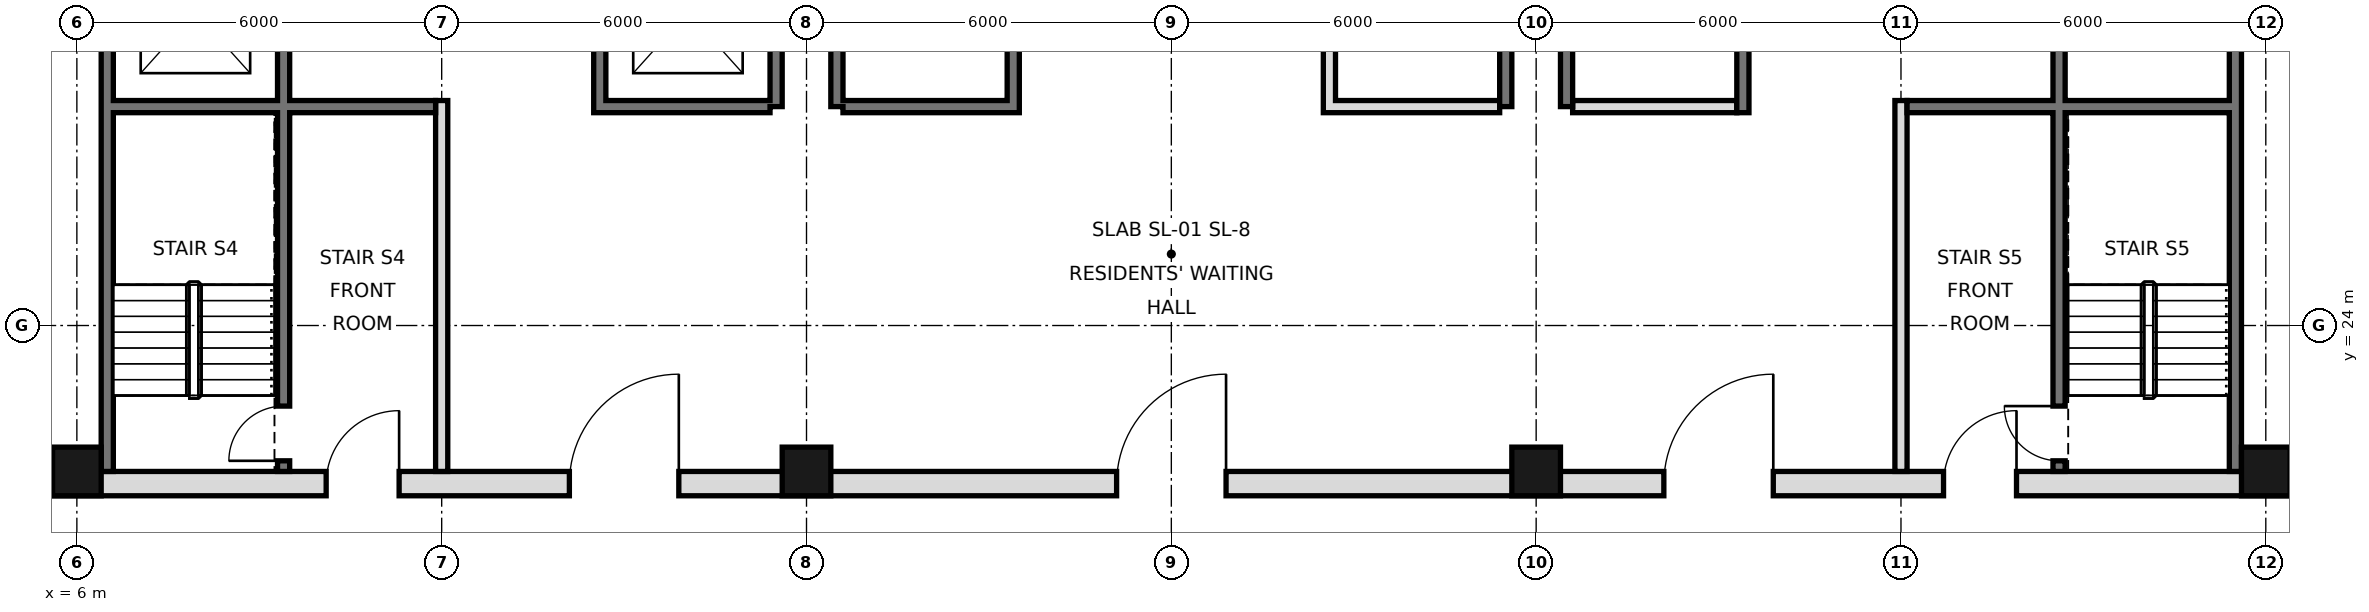
"""IFC4 building model, lengths in metres.
Left out: names, types, materials, properties, quantities, classifications, styles, units other than length and angle.
Written with IfcOpenShell. Run it as: python <this file> out.ifc"""

import sys

from ifc_helpers import new_model, si_unit, direction, frame, frame_2d, origin, origin_2d, place, context, subcontext, project, spatial, rectangle, hollow_rectangle, extrude, element, fill, save


model = new_model("IFC4")
c1 = context("Model", 3, precision=1e-05, world=origin(), true_north=direction((0.0, 1.0)))
c2 = subcontext(c1, "Body", "Model", "MODEL_VIEW")
j1 = project(units=[si_unit("LENGTHUNIT", "METRE"), si_unit("PLANEANGLEUNIT", "RADIAN")], contexts=[c1])
p1 = place(None, origin())
s1 = spatial("IfcSite", under=j1, at=p1, CompositionType="ELEMENT")
p2 = place(p1, origin())
s2 = spatial("IfcBuilding", under=s1, at=p2, CompositionType="ELEMENT")
p3 = place(p2, frame((0.0, 0.0, 114.2)))
s3 = spatial("IfcBuildingStorey", under=s2, at=p3, CompositionType="ELEMENT", Elevation=114.2)
for number, where, z_axis, x_axis in (
    (1, (6.0, 21.6, 0.0), (0.0, 0.0, 1.0), (1.0, 0.0, 0.0)),
    (2, (18.0, 21.6, 0.0), (0.0, 0.0, 1.0), (1.0, 0.0, 0.0)),
    (3, (30.0, 21.6, 0.0), (0.0, 0.0, 1.0), (1.0, 0.0, 0.0)),
    (4, (42.0, 21.6, 0.0), (0.0, 0.0, 1.0), (1.0, 0.0, 0.0)),
):
    element("IfcColumn", number, at=place(p3, frame(where, z_axis=z_axis, x_axis=x_axis)), inside=s3, PredefinedType="COLUMN", context=c2, shape_type="SweptSolid", body=[
        extrude(hollow_rectangle(XDim=0.8, YDim=0.8, WallThickness=0.05, at=origin_2d()), origin(), (0.0, 0.0, 1.0), 5.4),
    ])
for number, where, z_axis, x_axis in (
    (5, (6.5, 21.6, 0.0), (0.0, 0.0, 1.0), (0.0, 1.0, 0.0)),
    (6, (41.5, 21.6, 0.0), (0.0, 0.0, 1.0), (0.0, 1.0, 0.0)),
):
    element("IfcWall", number, at=place(p3, frame(where, z_axis=z_axis, x_axis=x_axis)), inside=s3, PredefinedType="SOLIDWALL", context=c2, shape_type="SweptSolid", body=[
        extrude(rectangle(XDim=23.5, YDim=0.2, at=frame_2d((11.75, 0.0))), origin(), (0.0, 0.0, 1.0), 5.22),
    ])
for number, where, z_axis, x_axis in (
    (7, (17.5, 27.6, 0.0), (0.0, 0.0, 1.0), (0.0, 1.0, 0.0)),
    (8, (18.5, 27.6, 0.0), (0.0, 0.0, 1.0), (0.0, 1.0, 0.0)),
    (9, (29.5, 27.6, 0.0), (0.0, 0.0, 1.0), (0.0, 1.0, 0.0)),
    (10, (30.5, 27.6, 0.0), (0.0, 0.0, 1.0), (0.0, 1.0, 0.0)),
):
    element("IfcWall", number, at=place(p3, frame(where, z_axis=z_axis, x_axis=x_axis)), inside=s3, PredefinedType="SOLIDWALL", context=c2, shape_type="SweptSolid", body=[
        extrude(rectangle(XDim=17.5, YDim=0.2, at=frame_2d((8.75, 0.0))), origin(), (0.0, 0.0, 1.0), 5.22),
    ])
p4 = place(p3, frame((5.6, 21.4, 0.0), z_axis=(0.0, 0.0, 1.0), x_axis=(1.0, 0.0, 0.0)))
e11 = element("IfcWall", 11, at=p4, inside=s3, PredefinedType="SOLIDWALL", context=c2, shape_type="SweptSolid", body=[
    extrude(rectangle(XDim=36.8, YDim=0.4, at=frame_2d((18.4, 0.0))), origin(), (0.0, 0.0, 1.0), 5.22),
])
p5 = place(p4, frame((8.5, 0.0, 0.0)))
e12 = element("IfcOpeningElement", 12, at=p5, cuts=e11, PredefinedType="OPENING", context=c2, shape_type="SweptSolid", body=[
    extrude(rectangle(XDim=1.8, YDim=2.1, at=frame_2d((0.9, 1.05))), frame((0.0, 0.21, 0.0), z_axis=(0.0, -1.0, 0.0), x_axis=(1.0, 0.0, 0.0)), (0.0, 0.0, 1.0), 0.42),
])
p6 = place(p4, frame((17.5, 0.0, 0.0)))
e13 = element("IfcOpeningElement", 13, at=p6, cuts=e11, PredefinedType="OPENING", context=c2, shape_type="SweptSolid", body=[
    extrude(rectangle(XDim=1.8, YDim=2.1, at=frame_2d((0.9, 1.05))), frame((0.0, 0.21, 0.0), z_axis=(0.0, -1.0, 0.0), x_axis=(1.0, 0.0, 0.0)), (0.0, 0.0, 1.0), 0.42),
])
p7 = place(p4, frame((26.5, 0.0, 0.0)))
e14 = element("IfcOpeningElement", 14, at=p7, cuts=e11, PredefinedType="OPENING", context=c2, shape_type="SweptSolid", body=[
    extrude(rectangle(XDim=1.8, YDim=2.1, at=frame_2d((0.9, 1.05))), frame((0.0, 0.21, 0.0), z_axis=(0.0, -1.0, 0.0), x_axis=(1.0, 0.0, 0.0)), (0.0, 0.0, 1.0), 0.42),
])
p8 = place(p4, frame((4.5, 0.0, 0.0)))
e15 = element("IfcOpeningElement", 15, at=p8, cuts=e11, PredefinedType="OPENING", context=c2, shape_type="SweptSolid", body=[
    extrude(rectangle(XDim=1.2, YDim=2.1, at=frame_2d((0.6, 1.05))), frame((0.0, 0.21, 0.0), z_axis=(0.0, -1.0, 0.0), x_axis=(1.0, 0.0, 0.0)), (0.0, 0.0, 1.0), 0.42),
])
p9 = place(p4, frame((31.1, 0.0, 0.0)))
e16 = element("IfcOpeningElement", 16, at=p9, cuts=e11, PredefinedType="OPENING", context=c2, shape_type="SweptSolid", body=[
    extrude(rectangle(XDim=1.2, YDim=2.1, at=frame_2d((0.6, 1.05))), frame((0.0, 0.21, 0.0), z_axis=(0.0, -1.0, 0.0), x_axis=(1.0, 0.0, 0.0)), (0.0, 0.0, 1.0), 0.42),
])
p10 = place(p3, frame((12.0, 21.6, 0.0), z_axis=(0.0, 0.0, 1.0), x_axis=(0.0, 1.0, 0.0)))
e17 = element("IfcWall", 17, at=p10, inside=s3, PredefinedType="PARTITIONING", context=c2, shape_type="SweptSolid", body=[
    extrude(rectangle(XDim=6.1, YDim=0.2, at=frame_2d((3.05, 0.0))), origin(), (0.0, 0.0, 1.0), 5.22),
])
p11 = place(p3, frame((14.6, 27.5, 0.0), z_axis=(0.0, 0.0, 1.0), x_axis=(0.0, 1.0, 0.0)))
e18 = element("IfcWall", 18, at=p11, inside=s3, PredefinedType="SOLIDWALL", context=c2, shape_type="SweptSolid", body=[
    extrude(rectangle(XDim=17.5, YDim=0.2, at=frame_2d((8.75, 0.0))), origin(), (0.0, 0.0, 1.0), 5.22),
])
p12 = place(p11, frame((1.1, 0.0, 0.0)))
e19 = element("IfcOpeningElement", 19, at=p12, cuts=e18, PredefinedType="OPENING", context=c2, shape_type="SweptSolid", body=[
    extrude(rectangle(XDim=1.1, YDim=2.1, at=frame_2d((0.55, 1.05))), frame((0.0, 0.11, 0.0), z_axis=(0.0, -1.0, 0.0), x_axis=(1.0, 0.0, 0.0)), (0.0, 0.0, 1.0), 0.22),
])
p13 = place(p11, frame((4.2, 0.0, 0.0)))
e20 = element("IfcOpeningElement", 20, at=p13, cuts=e18, PredefinedType="OPENING", context=c2, shape_type="SweptSolid", body=[
    extrude(rectangle(XDim=1.1, YDim=2.1, at=frame_2d((0.55, 1.05))), frame((0.0, 0.11, 0.0), z_axis=(0.0, -1.0, 0.0), x_axis=(1.0, 0.0, 0.0)), (0.0, 0.0, 1.0), 0.22),
])
p14 = place(p11, frame((15.4, 0.0, 0.0)))
e21 = element("IfcOpeningElement", 21, at=p14, cuts=e18, PredefinedType="OPENING", context=c2, shape_type="SweptSolid", body=[
    extrude(rectangle(XDim=1.1, YDim=2.1, at=frame_2d((0.55, 1.05))), frame((0.0, 0.11, 0.0), z_axis=(0.0, -1.0, 0.0), x_axis=(1.0, 0.0, 0.0)), (0.0, 0.0, 1.0), 0.22),
])
p15 = place(p11, frame((9.9, 0.0, 0.0)))
e22 = element("IfcOpeningElement", 22, at=p15, cuts=e18, PredefinedType="OPENING", context=c2, shape_type="SweptSolid", body=[
    extrude(rectangle(XDim=0.9, YDim=2.1, at=frame_2d((0.45, 1.05))), frame((0.0, 0.11, 0.0), z_axis=(0.0, -1.0, 0.0), x_axis=(1.0, 0.0, 0.0)), (0.0, 0.0, 1.0), 0.22),
])
p16 = place(p3, frame((21.4, 27.5, 0.0), z_axis=(0.0, 0.0, 1.0), x_axis=(0.0, 1.0, 0.0)))
e23 = element("IfcWall", 23, at=p16, inside=s3, PredefinedType="SOLIDWALL", context=c2, shape_type="SweptSolid", body=[
    extrude(rectangle(XDim=17.5, YDim=0.2, at=frame_2d((8.75, 0.0))), origin(), (0.0, 0.0, 1.0), 5.22),
])
p17 = place(p16, frame((16.2, 0.0, 0.0)))
e24 = element("IfcOpeningElement", 24, at=p17, cuts=e23, PredefinedType="OPENING", context=c2, shape_type="SweptSolid", body=[
    extrude(rectangle(XDim=1.0, YDim=2.1, at=frame_2d((0.5, 1.05))), frame((0.0, 0.11, 0.0), z_axis=(0.0, -1.0, 0.0), x_axis=(1.0, 0.0, 0.0)), (0.0, 0.0, 1.0), 0.22),
])
p18 = place(p16, frame((7.4, 0.0, 0.0)))
e25 = element("IfcOpeningElement", 25, at=p18, cuts=e23, PredefinedType="OPENING", context=c2, shape_type="SweptSolid", body=[
    extrude(rectangle(XDim=0.9, YDim=2.1, at=frame_2d((0.45, 1.05))), frame((0.0, 0.11, 0.0), z_axis=(0.0, -1.0, 0.0), x_axis=(1.0, 0.0, 0.0)), (0.0, 0.0, 1.0), 0.22),
])
p19 = place(p3, frame((26.6, 27.5, 0.0), z_axis=(0.0, 0.0, 1.0), x_axis=(0.0, 1.0, 0.0)))
e26 = element("IfcWall", 26, at=p19, inside=s3, PredefinedType="SOLIDWALL", context=c2, shape_type="SweptSolid", body=[
    extrude(rectangle(XDim=17.5, YDim=0.2, at=frame_2d((8.75, 0.0))), origin(), (0.0, 0.0, 1.0), 5.22),
])
p20 = place(p19, frame((4.3, 0.0, 0.0)))
e27 = element("IfcOpeningElement", 27, at=p20, cuts=e26, PredefinedType="OPENING", context=c2, shape_type="SweptSolid", body=[
    extrude(rectangle(XDim=0.9, YDim=2.1, at=frame_2d((0.45, 1.05))), frame((0.0, 0.11, 0.0), z_axis=(0.0, -1.0, 0.0), x_axis=(1.0, 0.0, 0.0)), (0.0, 0.0, 1.0), 0.22),
])
p21 = place(p19, frame((10.35, 0.0, 0.0)))
e28 = element("IfcOpeningElement", 28, at=p21, cuts=e26, PredefinedType="OPENING", context=c2, shape_type="SweptSolid", body=[
    extrude(rectangle(XDim=1.0, YDim=2.1, at=frame_2d((0.5, 1.05))), frame((0.0, 0.11, 0.0), z_axis=(0.0, -1.0, 0.0), x_axis=(1.0, 0.0, 0.0)), (0.0, 0.0, 1.0), 0.22),
])
p22 = place(p19, frame((14.575, 0.0, 0.0)))
e29 = element("IfcOpeningElement", 29, at=p22, cuts=e26, PredefinedType="OPENING", context=c2, shape_type="SweptSolid", body=[
    extrude(rectangle(XDim=1.0, YDim=2.1, at=frame_2d((0.5, 1.05))), frame((0.0, 0.11, 0.0), z_axis=(0.0, -1.0, 0.0), x_axis=(1.0, 0.0, 0.0)), (0.0, 0.0, 1.0), 0.22),
])
p23 = place(p3, frame((33.4, 27.5, 0.0), z_axis=(0.0, 0.0, 1.0), x_axis=(0.0, 1.0, 0.0)))
e30 = element("IfcWall", 30, at=p23, inside=s3, PredefinedType="SOLIDWALL", context=c2, shape_type="SweptSolid", body=[
    extrude(rectangle(XDim=17.5, YDim=0.2, at=frame_2d((8.75, 0.0))), origin(), (0.0, 0.0, 1.0), 5.22),
])
p24 = place(p23, frame((15.4, 0.0, 0.0)))
e31 = element("IfcOpeningElement", 31, at=p24, cuts=e30, PredefinedType="OPENING", context=c2, shape_type="SweptSolid", body=[
    extrude(rectangle(XDim=1.1, YDim=2.1, at=frame_2d((0.55, 1.05))), frame((0.0, 0.11, 0.0), z_axis=(0.0, -1.0, 0.0), x_axis=(1.0, 0.0, 0.0)), (0.0, 0.0, 1.0), 0.22),
])
p25 = place(p23, frame((2.7, 0.0, 0.0)))
e32 = element("IfcOpeningElement", 32, at=p25, cuts=e30, PredefinedType="OPENING", context=c2, shape_type="SweptSolid", body=[
    extrude(rectangle(XDim=1.0, YDim=2.1, at=frame_2d((0.5, 1.05))), frame((0.0, 0.11, 0.0), z_axis=(0.0, -1.0, 0.0), x_axis=(1.0, 0.0, 0.0)), (0.0, 0.0, 1.0), 0.22),
])
p26 = place(p23, frame((9.9, 0.0, 0.0)))
e33 = element("IfcOpeningElement", 33, at=p26, cuts=e30, PredefinedType="OPENING", context=c2, shape_type="SweptSolid", body=[
    extrude(rectangle(XDim=0.9, YDim=2.1, at=frame_2d((0.45, 1.05))), frame((0.0, 0.11, 0.0), z_axis=(0.0, -1.0, 0.0), x_axis=(1.0, 0.0, 0.0)), (0.0, 0.0, 1.0), 0.22),
])
p27 = place(p3, frame((36.0, 21.6, 0.0), z_axis=(0.0, 0.0, 1.0), x_axis=(0.0, 1.0, 0.0)))
e34 = element("IfcWall", 34, at=p27, inside=s3, PredefinedType="PARTITIONING", context=c2, shape_type="SweptSolid", body=[
    extrude(rectangle(XDim=6.1, YDim=0.2, at=frame_2d((3.05, 0.0))), origin(), (0.0, 0.0, 1.0), 5.22),
])
p28 = place(p3, frame((38.6, 21.6, 0.0), z_axis=(0.0, 0.0, 1.0), x_axis=(0.0, 1.0, 0.0)))
e35 = element("IfcWall", 35, at=p28, inside=s3, PredefinedType="SOLIDWALL", context=c2, shape_type="SweptSolid", body=[
    extrude(rectangle(XDim=23.4, YDim=0.2, at=frame_2d((11.7, 0.0))), origin(), (0.0, 0.0, 1.0), 5.22),
])
p29 = place(p28, frame((8.6, 0.0, 0.0)))
e36 = element("IfcOpeningElement", 36, at=p29, cuts=e35, PredefinedType="OPENING", context=c2, shape_type="SweptSolid", body=[
    extrude(rectangle(XDim=1.0, YDim=2.1, at=frame_2d((0.5, 1.05))), frame((0.0, 0.11, 0.0), z_axis=(0.0, -1.0, 0.0), x_axis=(1.0, 0.0, 0.0)), (0.0, 0.0, 1.0), 0.22),
])
p30 = place(p28, frame((13.25, 0.0, 0.0)))
e37 = element("IfcOpeningElement", 37, at=p30, cuts=e35, PredefinedType="OPENING", context=c2, shape_type="SweptSolid", body=[
    extrude(rectangle(XDim=1.0, YDim=2.1, at=frame_2d((0.5, 1.05))), frame((0.0, 0.11, 0.0), z_axis=(0.0, -1.0, 0.0), x_axis=(1.0, 0.0, 0.0)), (0.0, 0.0, 1.0), 0.22),
])
p31 = place(p28, frame((22.1, 0.0, 0.0)))
e38 = element("IfcOpeningElement", 38, at=p31, cuts=e35, PredefinedType="OPENING", context=c2, shape_type="SweptSolid", body=[
    extrude(rectangle(XDim=1.0, YDim=2.1, at=frame_2d((0.5, 1.05))), frame((0.0, 0.11, 0.0), z_axis=(0.0, -1.0, 0.0), x_axis=(1.0, 0.0, 0.0)), (0.0, 0.0, 1.0), 0.22),
])
p32 = place(p28, frame((0.175, 0.0, 0.0)))
e39 = element("IfcOpeningElement", 39, at=p32, cuts=e35, PredefinedType="OPENING", context=c2, shape_type="SweptSolid", body=[
    extrude(rectangle(XDim=0.9, YDim=2.1, at=frame_2d((0.45, 1.05))), frame((0.0, 0.11, 0.0), z_axis=(0.0, -1.0, 0.0), x_axis=(1.0, 0.0, 0.0)), (0.0, 0.0, 1.0), 0.22),
])
p33 = place(p3, frame((9.4, 21.6, 0.0), z_axis=(0.0, 0.0, 1.0), x_axis=(0.0, 1.0, 0.0)))
e40 = element("IfcWall", 40, at=p33, inside=s3, PredefinedType="SOLIDWALL", context=c2, shape_type="SweptSolid", body=[
    extrude(rectangle(XDim=23.4, YDim=0.2, at=frame_2d((11.7, 0.0))), origin(), (0.0, 0.0, 1.0), 5.22),
])
p34 = place(p33, frame((7.0, 0.0, 0.0)))
e41 = element("IfcOpeningElement", 41, at=p34, cuts=e40, PredefinedType="OPENING", context=c2, shape_type="SweptSolid", body=[
    extrude(rectangle(XDim=1.1, YDim=2.1, at=frame_2d((0.55, 1.05))), frame((0.0, 0.11, 0.0), z_axis=(0.0, -1.0, 0.0), x_axis=(1.0, 0.0, 0.0)), (0.0, 0.0, 1.0), 0.22),
])
p35 = place(p33, frame((10.1, 0.0, 0.0)))
e42 = element("IfcOpeningElement", 42, at=p35, cuts=e40, PredefinedType="OPENING", context=c2, shape_type="SweptSolid", body=[
    extrude(rectangle(XDim=1.1, YDim=2.1, at=frame_2d((0.55, 1.05))), frame((0.0, 0.11, 0.0), z_axis=(0.0, -1.0, 0.0), x_axis=(1.0, 0.0, 0.0)), (0.0, 0.0, 1.0), 0.22),
])
p36 = place(p33, frame((13.2, 0.0, 0.0)))
e43 = element("IfcOpeningElement", 43, at=p36, cuts=e40, PredefinedType="OPENING", context=c2, shape_type="SweptSolid", body=[
    extrude(rectangle(XDim=1.1, YDim=2.1, at=frame_2d((0.55, 1.05))), frame((0.0, 0.11, 0.0), z_axis=(0.0, -1.0, 0.0), x_axis=(1.0, 0.0, 0.0)), (0.0, 0.0, 1.0), 0.22),
])
p37 = place(p33, frame((22.1, 0.0, 0.0)))
e44 = element("IfcOpeningElement", 44, at=p37, cuts=e40, PredefinedType="OPENING", context=c2, shape_type="SweptSolid", body=[
    extrude(rectangle(XDim=1.0, YDim=2.1, at=frame_2d((0.5, 1.05))), frame((0.0, 0.11, 0.0), z_axis=(0.0, -1.0, 0.0), x_axis=(1.0, 0.0, 0.0)), (0.0, 0.0, 1.0), 0.22),
])
p38 = place(p33, frame((0.175, 0.0, 0.0)))
e45 = element("IfcOpeningElement", 45, at=p38, cuts=e40, PredefinedType="OPENING", context=c2, shape_type="SweptSolid", body=[
    extrude(rectangle(XDim=0.9, YDim=2.1, at=frame_2d((0.45, 1.05))), frame((0.0, 0.11, 0.0), z_axis=(0.0, -1.0, 0.0), x_axis=(1.0, 0.0, 0.0)), (0.0, 0.0, 1.0), 0.22),
])
for number, where, z_axis, x_axis in (
    (46, (14.7, 27.6, 0.0), (0.0, 0.0, 1.0), (1.0, 0.0, 0.0)),
    (47, (18.6, 27.6, 0.0), (0.0, 0.0, 1.0), (1.0, 0.0, 0.0)),
    (48, (26.7, 27.6, 0.0), (0.0, 0.0, 1.0), (1.0, 0.0, 0.0)),
):
    element("IfcWall", number, at=place(p3, frame(where, z_axis=z_axis, x_axis=x_axis)), inside=s3, PredefinedType="SOLIDWALL", context=c2, shape_type="SweptSolid", body=[
        extrude(rectangle(XDim=2.7, YDim=0.2, at=frame_2d((1.35, 0.0))), origin(), (0.0, 0.0, 1.0), 5.22),
    ])
p39 = place(p3, frame((30.6, 27.6, 0.0), z_axis=(0.0, 0.0, 1.0), x_axis=(1.0, 0.0, 0.0)))
e49 = element("IfcWall", 49, at=p39, inside=s3, PredefinedType="PARTITIONING", context=c2, shape_type="SweptSolid", body=[
    extrude(rectangle(XDim=2.7, YDim=0.2, at=frame_2d((1.35, 0.0))), origin(), (0.0, 0.0, 1.0), 5.22),
])
for number, where, z_axis, x_axis in (
    (50, (36.1, 27.6, 0.0), (0.0, 0.0, 1.0), (1.0, 0.0, 0.0)),
    (51, (6.6, 27.6, 0.0), (0.0, 0.0, 1.0), (1.0, 0.0, 0.0)),
):
    element("IfcWall", number, at=place(p3, frame(where, z_axis=z_axis, x_axis=x_axis)), inside=s3, PredefinedType="SOLIDWALL", context=c2, shape_type="SweptSolid", body=[
        extrude(rectangle(XDim=5.3, YDim=0.2, at=frame_2d((2.65, 0.0))), origin(), (0.0, 0.0, 1.0), 5.22),
    ])
p40 = place(p5, frame((1.8, 0.0, 0.0), z_axis=(0.0, 0.0, 1.0), x_axis=(-1.0, 0.0, 0.0)))
e52 = element("IfcDoor", 52, at=p40, inside=s3, OperationType="SINGLE_SWING_LEFT", PredefinedType="DOOR", context=c2, shape_type="SweptSolid", body=[
    extrude(rectangle(XDim=1.8, YDim=2.1, at=frame_2d((0.9, 1.05))), frame((0.0, 0.025, 0.0), z_axis=(0.0, -1.0, 0.0), x_axis=(1.0, 0.0, 0.0)), (0.0, 0.0, 1.0), 0.05),
])
fill(e12, e52)
p41 = place(p6, frame((1.8, 0.0, 0.0), z_axis=(0.0, 0.0, 1.0), x_axis=(-1.0, 0.0, 0.0)))
e53 = element("IfcDoor", 53, at=p41, inside=s3, OperationType="SINGLE_SWING_LEFT", PredefinedType="DOOR", context=c2, shape_type="SweptSolid", body=[
    extrude(rectangle(XDim=1.8, YDim=2.1, at=frame_2d((0.9, 1.05))), frame((0.0, 0.025, 0.0), z_axis=(0.0, -1.0, 0.0), x_axis=(1.0, 0.0, 0.0)), (0.0, 0.0, 1.0), 0.05),
])
fill(e13, e53)
p42 = place(p7, frame((1.8, 0.0, 0.0), z_axis=(0.0, 0.0, 1.0), x_axis=(-1.0, 0.0, 0.0)))
e54 = element("IfcDoor", 54, at=p42, inside=s3, OperationType="SINGLE_SWING_LEFT", PredefinedType="DOOR", context=c2, shape_type="SweptSolid", body=[
    extrude(rectangle(XDim=1.8, YDim=2.1, at=frame_2d((0.9, 1.05))), frame((0.0, 0.025, 0.0), z_axis=(0.0, -1.0, 0.0), x_axis=(1.0, 0.0, 0.0)), (0.0, 0.0, 1.0), 0.05),
])
fill(e14, e54)
p43 = place(p8, frame((1.2, 0.0, 0.0), z_axis=(0.0, 0.0, 1.0), x_axis=(-1.0, 0.0, 0.0)))
e55 = element("IfcDoor", 55, at=p43, inside=s3, OperationType="SINGLE_SWING_LEFT", PredefinedType="DOOR", context=c2, shape_type="SweptSolid", body=[
    extrude(rectangle(XDim=1.2, YDim=2.1, at=frame_2d((0.6, 1.05))), frame((0.0, 0.025, 0.0), z_axis=(0.0, -1.0, 0.0), x_axis=(1.0, 0.0, 0.0)), (0.0, 0.0, 1.0), 0.05),
])
fill(e15, e55)
p44 = place(p9, frame((1.2, 0.0, 0.0), z_axis=(0.0, 0.0, 1.0), x_axis=(-1.0, 0.0, 0.0)))
e56 = element("IfcDoor", 56, at=p44, inside=s3, OperationType="SINGLE_SWING_LEFT", PredefinedType="DOOR", context=c2, shape_type="SweptSolid", body=[
    extrude(rectangle(XDim=1.2, YDim=2.1, at=frame_2d((0.6, 1.05))), frame((0.0, 0.025, 0.0), z_axis=(0.0, -1.0, 0.0), x_axis=(1.0, 0.0, 0.0)), (0.0, 0.0, 1.0), 0.05),
])
fill(e16, e56)
p45 = place(p38, origin())
e57 = element("IfcDoor", 57, at=p45, inside=s3, OperationType="SINGLE_SWING_LEFT", PredefinedType="DOOR", context=c2, shape_type="SweptSolid", body=[
    extrude(rectangle(XDim=0.9, YDim=2.1, at=frame_2d((0.45, 1.05))), frame((0.0, 0.025, 0.0), z_axis=(0.0, -1.0, 0.0), x_axis=(1.0, 0.0, 0.0)), (0.0, 0.0, 1.0), 0.05),
])
fill(e45, e57)
p46 = place(p32, frame((0.9, 0.0, 0.0), z_axis=(0.0, 0.0, 1.0), x_axis=(-1.0, 0.0, 0.0)))
e58 = element("IfcDoor", 58, at=p46, inside=s3, OperationType="SINGLE_SWING_LEFT", PredefinedType="DOOR", context=c2, shape_type="SweptSolid", body=[
    extrude(rectangle(XDim=0.9, YDim=2.1, at=frame_2d((0.45, 1.05))), frame((0.0, 0.025, 0.0), z_axis=(0.0, -1.0, 0.0), x_axis=(1.0, 0.0, 0.0)), (0.0, 0.0, 1.0), 0.05),
])
fill(e39, e58)
save(model, sys.argv[1])
